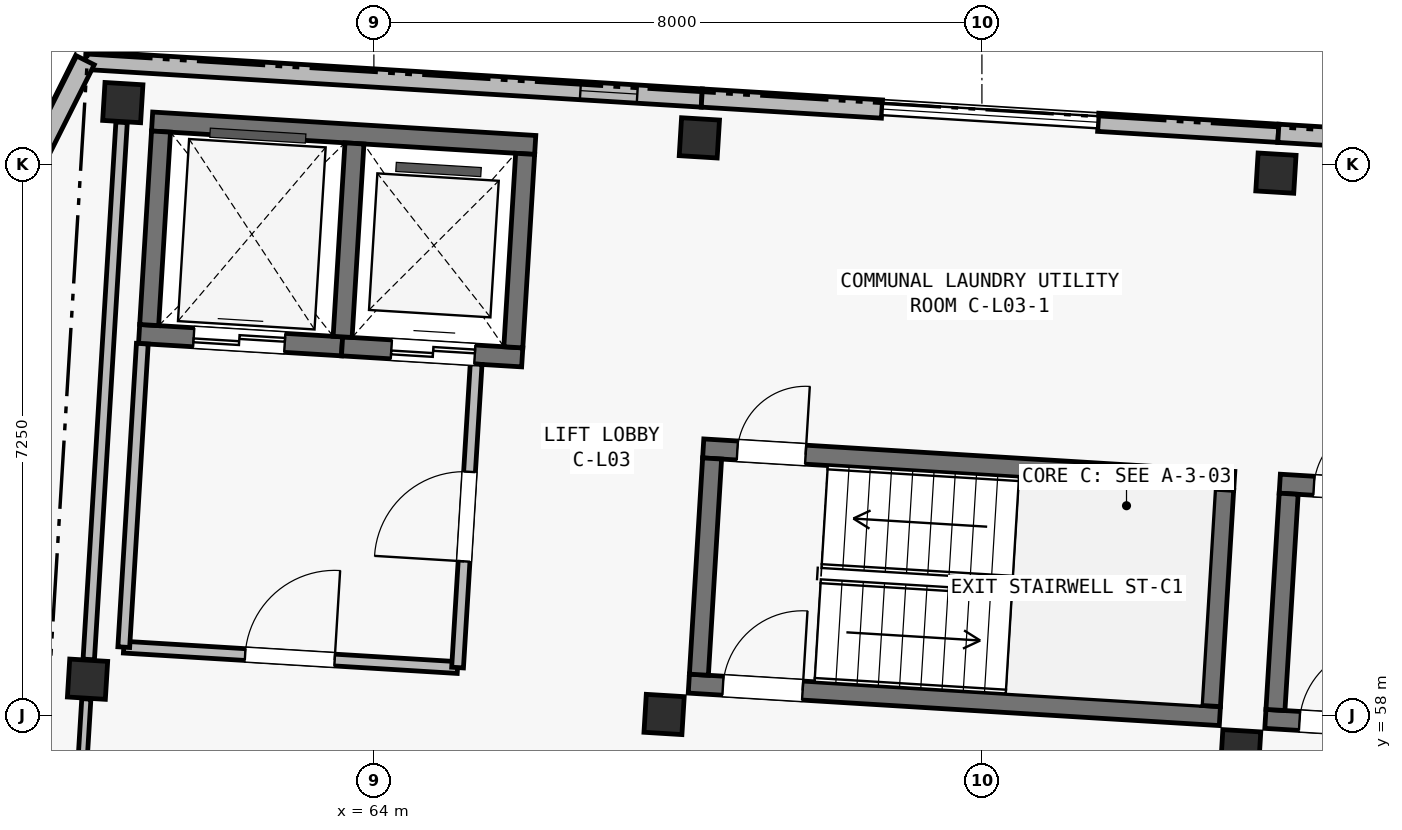
"""IFC4 building model, lengths in metres.
Left out: names, types, materials, properties, quantities, classifications, styles, units other than length and angle.
Written with IfcOpenShell. Run it as: python <this file> out.ifc"""

import sys

from ifc_helpers import new_model, si_unit, direction, frame, frame_2d, origin, origin_2d, place, context, subcontext, project, spatial, rectangle, extrude, element, fill, save


model = new_model("IFC4")
c1 = context("Model", 3, precision=1e-05, world=origin(), true_north=direction((0.0, 1.0)))
c2 = subcontext(c1, "Body", "Model", "MODEL_VIEW")
j1 = project(units=[si_unit("LENGTHUNIT", "METRE"), si_unit("PLANEANGLEUNIT", "RADIAN")], contexts=[c1])
p1 = place(None, origin())
s1 = spatial("IfcSite", under=j1, at=p1, CompositionType="ELEMENT")
p2 = place(p1, origin())
s2 = spatial("IfcBuilding", under=s1, at=p2, CompositionType="ELEMENT")
p3 = place(p2, frame((0.0, 0.0, 11.65)))
s3 = spatial("IfcBuildingStorey", under=s2, at=p3, CompositionType="ELEMENT", Elevation=11.65)
for number, where, z_axis, x_axis in (
    (1, (60.233, 58.478, 0.0), (0.0, 0.0, 1.0), (0.998, -0.061, 0.0)),
    (2, (60.697, 66.063, 0.0), (0.0, 0.0, 1.0), (0.998, -0.061, 0.0)),
    (3, (67.818, 58.014, 0.0), (0.0, 0.0, 1.0), (0.998, -0.061, 0.0)),
    (4, (68.282, 65.599, 0.0), (0.0, 0.0, 1.0), (0.998, -0.061, 0.0)),
    (5, (75.404, 57.55, 0.0), (0.0, 0.0, 1.0), (0.998, -0.061, 0.0)),
    (6, (75.868, 65.135, 0.0), (0.0, 0.0, 1.0), (0.998, -0.061, 0.0)),
):
    element("IfcColumn", number, at=place(p3, frame(where, z_axis=z_axis, x_axis=x_axis)), inside=s3, PredefinedType="COLUMN", context=c2, shape_type="SweptSolid", body=[
        extrude(rectangle(XDim=0.5, YDim=0.5, at=origin_2d()), origin(), (0.0, 0.0, 1.0), 3.25),
    ])
p4 = place(p3, frame((61.082, 65.814, 0.0), z_axis=(0.0, 0.0, 1.0), x_axis=(0.998134101522, -0.061059932685, 0.0)))
e7 = element("IfcWall", 7, at=p4, inside=s3, PredefinedType="SHEAR", context=c2, shape_type="SweptSolid", body=[
    extrude(rectangle(XDim=5.05, YDim=0.25, at=frame_2d((2.525, 0.0))), origin(), (0.0, 0.0, 1.0), 3.25),
])
p5 = place(p3, frame((60.911, 63.02, 0.0), z_axis=(0.0, 0.0, 1.0), x_axis=(0.998134099905, -0.061059959111, 0.0)))
e8 = element("IfcWall", 8, at=p5, inside=s3, PredefinedType="SHEAR", context=c2, shape_type="SweptSolid", body=[
    extrude(rectangle(XDim=2.675, YDim=0.25, at=frame_2d((1.337, 0.0))), origin(), (0.0, 0.0, 1.0), 3.25),
])
p6 = place(p5, frame((0.72, 0.0, 0.0)))
e9 = element("IfcOpeningElement", 9, at=p6, cuts=e8, PredefinedType="OPENING", context=c2, shape_type="SweptSolid", body=[
    extrude(rectangle(XDim=1.2, YDim=2.2, at=frame_2d((0.6, 1.1))), frame((0.0, 0.14, 0.0), z_axis=(0.0, -1.0, 0.0), x_axis=(1.0, 0.0, 0.0)), (0.0, 0.0, 1.0), 0.28),
])
p7 = place(p3, frame((63.581, 62.856, 0.0), z_axis=(0.0, 0.0, 1.0), x_axis=(0.998134103342, -0.061059902923, 0.0)))
e10 = element("IfcWall", 10, at=p7, inside=s3, PredefinedType="SHEAR", context=c2, shape_type="SweptSolid", body=[
    extrude(rectangle(XDim=2.375, YDim=0.25, at=frame_2d((1.188, 0.0))), origin(), (0.0, 0.0, 1.0), 3.25),
])
p8 = place(p7, frame((0.65, 0.0, 0.0)))
e11 = element("IfcOpeningElement", 11, at=p8, cuts=e10, PredefinedType="OPENING", context=c2, shape_type="SweptSolid", body=[
    extrude(rectangle(XDim=1.1, YDim=2.15, at=frame_2d((0.55, 1.075))), frame((0.0, 0.14, 0.0), z_axis=(0.0, -1.0, 0.0), x_axis=(1.0, 0.0, 0.0)), (0.0, 0.0, 1.0), 0.28),
])
p9 = place(p3, frame((61.043, 63.137, 0.0), z_axis=(0.0, 0.0, 1.0), x_axis=(0.061078919587, 0.998132939834, 0.0)))
e12 = element("IfcWall", 12, at=p9, inside=s3, PredefinedType="SHEAR", context=c2, shape_type="SweptSolid", body=[
    extrude(rectangle(XDim=2.55, YDim=0.25, at=frame_2d((1.275, 0.0))), origin(), (0.0, 0.0, 1.0), 3.25),
])
p10 = place(p3, frame((63.589, 62.981, 0.0), z_axis=(0.0, 0.0, 1.0), x_axis=(0.060989368901, 0.998138415692, 0.0)))
e13 = element("IfcWall", 13, at=p10, inside=s3, PredefinedType="SHEAR", context=c2, shape_type="SweptSolid", body=[
    extrude(rectangle(XDim=2.55, YDim=0.25, at=frame_2d((1.275, 0.0))), origin(), (0.0, 0.0, 1.0), 3.25),
])
p11 = place(p3, frame((65.834, 62.844, 0.0), z_axis=(0.0, 0.0, 1.0), x_axis=(0.061084756616, 0.998132582631, 0.0)))
e14 = element("IfcWall", 14, at=p11, inside=s3, PredefinedType="SHEAR", context=c2, shape_type="SweptSolid", body=[
    extrude(rectangle(XDim=2.55, YDim=0.25, at=frame_2d((1.275, 0.0))), origin(), (0.0, 0.0, 1.0), 3.25),
])
p12 = place(p3, frame((68.333, 61.514, 0.0), z_axis=(0.0, 0.0, 1.0), x_axis=(0.998135676081, -0.061034188237, 0.0)))
e15 = element("IfcWall", 15, at=p12, inside=s3, PredefinedType="SHEAR", context=c2, shape_type="SweptSolid", body=[
    extrude(rectangle(XDim=7.0, YDim=0.25, at=frame_2d((3.5, 0.0))), origin(), (0.0, 0.0, 1.0), 3.25),
])
p13 = place(p12, frame((0.45, 0.0, 0.0)))
e16 = element("IfcOpeningElement", 16, at=p13, cuts=e15, PredefinedType="OPENING", context=c2, shape_type="SweptSolid", body=[
    extrude(rectangle(XDim=0.9, YDim=2.1, at=frame_2d((0.45, 1.05))), frame((0.0, 0.14, 0.0), z_axis=(0.0, -1.0, 0.0), x_axis=(1.0, 0.0, 0.0)), (0.0, 0.0, 1.0), 0.28),
])
p14 = place(p3, frame((68.144, 58.419, 0.0), z_axis=(0.0, 0.0, 1.0), x_axis=(0.998135546153, -0.061036313012, 0.0)))
e17 = element("IfcWall", 17, at=p14, inside=s3, PredefinedType="SHEAR", context=c2, shape_type="SweptSolid", body=[
    extrude(rectangle(XDim=7.0, YDim=0.25, at=frame_2d((3.5, 0.0))), origin(), (0.0, 0.0, 1.0), 3.25),
])
p15 = place(p14, frame((0.45, 0.0, 0.0)))
e18 = element("IfcOpeningElement", 18, at=p15, cuts=e17, PredefinedType="OPENING", context=c2, shape_type="SweptSolid", body=[
    extrude(rectangle(XDim=1.05, YDim=2.15, at=frame_2d((0.525, 1.075))), frame((0.0, 0.14, 0.0), z_axis=(0.0, -1.0, 0.0), x_axis=(1.0, 0.0, 0.0)), (0.0, 0.0, 1.0), 0.28),
])
for number, where, z_axis, x_axis in (
    (19, (68.276, 58.537, 0.0), (0.0, 0.0, 1.0), (0.061, 0.998, 0.0)),
    (20, (75.014, 58.125, 0.0), (0.0, 0.0, 1.0), (0.061, 0.998, 0.0)),
):
    element("IfcWall", number, at=place(p3, frame(where, z_axis=z_axis, x_axis=x_axis)), inside=s3, PredefinedType="SHEAR", context=c2, shape_type="SweptSolid", body=[
        extrude(rectangle(XDim=2.85, YDim=0.25, at=frame_2d((1.425, 0.0))), origin(), (0.0, 0.0, 1.0), 3.25),
    ])
p16 = place(p3, frame((75.919, 61.05, 0.0), z_axis=(0.0, 0.0, 1.0), x_axis=(0.998135546153, -0.061036313012, 0.0)))
e21 = element("IfcWall", 21, at=p16, inside=s3, PredefinedType="SHEAR", context=c2, shape_type="SweptSolid", body=[
    extrude(rectangle(XDim=7.0, YDim=0.25, at=frame_2d((3.5, 0.0))), origin(), (0.0, 0.0, 1.0), 3.25),
])
p17 = place(p16, frame((0.45, 0.0, 0.0)))
e22 = element("IfcOpeningElement", 22, at=p17, cuts=e21, PredefinedType="OPENING", context=c2, shape_type="SweptSolid", body=[
    extrude(rectangle(XDim=0.9, YDim=2.1, at=frame_2d((0.45, 1.05))), frame((0.0, 0.14, 0.0), z_axis=(0.0, -1.0, 0.0), x_axis=(1.0, 0.0, 0.0)), (0.0, 0.0, 1.0), 0.28),
])
p18 = place(p3, frame((75.73, 57.956, 0.0), z_axis=(0.0, 0.0, 1.0), x_axis=(0.998135546153, -0.061036313012, 0.0)))
e23 = element("IfcWall", 23, at=p18, inside=s3, PredefinedType="SHEAR", context=c2, shape_type="SweptSolid", body=[
    extrude(rectangle(XDim=7.0, YDim=0.25, at=frame_2d((3.5, 0.0))), origin(), (0.0, 0.0, 1.0), 3.25),
])
p19 = place(p18, frame((0.45, 0.0, 0.0)))
e24 = element("IfcOpeningElement", 24, at=p19, cuts=e23, PredefinedType="OPENING", context=c2, shape_type="SweptSolid", body=[
    extrude(rectangle(XDim=1.05, YDim=2.15, at=frame_2d((0.525, 1.075))), frame((0.0, 0.14, 0.0), z_axis=(0.0, -1.0, 0.0), x_axis=(1.0, 0.0, 0.0)), (0.0, 0.0, 1.0), 0.28),
])
p20 = place(p3, frame((75.862, 58.073, 0.0), z_axis=(0.0, 0.0, 1.0), x_axis=(0.060991628362, 0.99813827763, 0.0)))
e25 = element("IfcWall", 25, at=p20, inside=s3, PredefinedType="SHEAR", context=c2, shape_type="SweptSolid", body=[
    extrude(rectangle(XDim=2.85, YDim=0.25, at=frame_2d((1.425, 0.0))), origin(), (0.0, 0.0, 1.0), 3.25),
])
p21 = place(p3, frame((60.205, 66.62, 0.0), z_axis=(0.0, 0.0, 1.0), x_axis=(0.998134248939, -0.061057522844, 0.0)))
e26 = element("IfcWall", 26, at=p21, inside=s3, PredefinedType="SOLIDWALL", context=c2, shape_type="SweptSolid", body=[
    extrude(rectangle(XDim=8.125, YDim=0.24, at=frame_2d((4.062, 0.0))), origin(), (0.0, 0.0, 1.0), 3.0),
])
p22 = place(p21, frame((6.525, 0.0, 0.45)))
e27 = element("IfcOpeningElement", 27, at=p22, cuts=e26, PredefinedType="OPENING", context=c2, shape_type="SweptSolid", body=[
    extrude(rectangle(XDim=0.75, YDim=2.32, at=frame_2d((0.375, 1.16))), frame((0.0, 0.135, 0.0), z_axis=(0.0, -1.0, 0.0), x_axis=(1.0, 0.0, 0.0)), (0.0, 0.0, 1.0), 0.27),
])
p23 = place(p3, frame((68.314, 66.124, 0.0), z_axis=(0.0, 0.0, 1.0), x_axis=(0.998134103342, -0.061059902923, 0.0)))
e28 = element("IfcWall", 28, at=p23, inside=s3, PredefinedType="SOLIDWALL", context=c2, shape_type="SweptSolid", body=[
    extrude(rectangle(XDim=2.375, YDim=0.24, at=frame_2d((1.188, 0.0))), origin(), (0.0, 0.0, 1.0), 3.0),
])
p24 = place(p3, frame((73.53, 65.804, 0.0), z_axis=(0.0, 0.0, 1.0), x_axis=(0.998133720034, -0.061066168473, 0.0)))
e29 = element("IfcWall", 29, at=p24, inside=s3, PredefinedType="SOLIDWALL", context=c2, shape_type="SweptSolid", body=[
    extrude(rectangle(XDim=2.375, YDim=0.24, at=frame_2d((1.188, 0.0))), origin(), (0.0, 0.0, 1.0), 3.0),
])
p25 = place(p3, frame((75.9, 65.659, 0.0), z_axis=(0.0, 0.0, 1.0), x_axis=(0.998140363035, -0.06095749076, 0.0)))
e30 = element("IfcWall", 30, at=p25, inside=s3, PredefinedType="SOLIDWALL", context=c2, shape_type="SweptSolid", body=[
    extrude(rectangle(XDim=2.375, YDim=0.24, at=frame_2d((1.188, 0.0))), origin(), (0.0, 0.0, 1.0), 3.0),
])
p26 = place(p3, frame((51.654, 49.585, 0.0), z_axis=(0.0, 0.0, 1.0), x_axis=(0.448621989068, 0.893721607059, 0.0)))
e31 = element("IfcWall", 31, at=p26, inside=s3, PredefinedType="SOLIDWALL", context=c2, shape_type="SweptSolid", body=[
    extrude(rectangle(XDim=19.061, YDim=0.26, at=frame_2d((9.53, 0.0))), origin(), (0.0, 0.0, 1.0), 3.0),
])
p27 = place(p26, frame((15.59, 0.0, 0.45)))
e32 = element("IfcOpeningElement", 32, at=p27, cuts=e31, PredefinedType="OPENING", context=c2, shape_type="SweptSolid", body=[
    extrude(rectangle(XDim=0.84, YDim=2.28, at=frame_2d((0.42, 1.14))), frame((0.0, 0.145, 0.0), z_axis=(0.0, -1.0, 0.0), x_axis=(1.0, 0.0, 0.0)), (0.0, 0.0, 1.0), 0.29),
])
p28 = place(p3, frame((60.709, 58.899, 0.0), z_axis=(0.0, 0.0, 1.0), x_axis=(0.998132276607, -0.061089756882, 0.0)))
e33 = element("IfcWall", 33, at=p28, inside=s3, PredefinedType="PARTITIONING", context=c2, shape_type="SweptSolid", body=[
    extrude(rectangle(XDim=4.4, YDim=0.155, at=frame_2d((2.2, 0.0))), origin(), (0.0, 0.0, 1.0), 2.97),
])
p29 = place(p28, frame((1.6, 0.0, 0.0)))
e34 = element("IfcOpeningElement", 34, at=p29, cuts=e33, PredefinedType="OPENING", context=c2, shape_type="SweptSolid", body=[
    extrude(rectangle(XDim=1.18, YDim=2.15, at=frame_2d((0.59, 1.075))), frame((0.0, 0.093, 0.0), z_axis=(0.0, -1.0, 0.0), x_axis=(1.0, 0.0, 0.0)), (0.0, 0.0, 1.0), 0.185),
])
p30 = place(p3, frame((60.709, 58.899, 0.0), z_axis=(0.0, 0.0, 1.0), x_axis=(0.061036844229, 0.998135513669, 0.0)))
e35 = element("IfcWall", 35, at=p30, inside=s3, PredefinedType="PARTITIONING", context=c2, shape_type="SweptSolid", body=[
    extrude(rectangle(XDim=4.0, YDim=0.155, at=frame_2d((2.0, 0.0))), origin(), (0.0, 0.0, 1.0), 2.97),
])
p31 = place(p3, frame((65.101, 58.631, 0.0), z_axis=(0.0, 0.0, 1.0), x_axis=(0.061033125904, 0.99813574104, 0.0)))
e36 = element("IfcWall", 36, at=p31, inside=s3, PredefinedType="PARTITIONING", context=c2, shape_type="SweptSolid", body=[
    extrude(rectangle(XDim=4.0, YDim=0.155, at=frame_2d((2.0, 0.0))), origin(), (0.0, 0.0, 1.0), 2.97),
])
p32 = place(p31, frame((1.4, 0.0, 0.0)))
e37 = element("IfcOpeningElement", 37, at=p32, cuts=e36, PredefinedType="OPENING", context=c2, shape_type="SweptSolid", body=[
    extrude(rectangle(XDim=1.18, YDim=2.15, at=frame_2d((0.59, 1.075))), frame((0.0, 0.093, 0.0), z_axis=(0.0, -1.0, 0.0), x_axis=(1.0, 0.0, 0.0)), (0.0, 0.0, 1.0), 0.185),
])
p33 = place(p3, frame((59.98, 54.345, 0.0), z_axis=(0.0, 0.0, 1.0), x_axis=(0.061101107425, 0.998131581843, 0.0)))
e38 = element("IfcWall", 38, at=p33, inside=s3, PredefinedType="PARTITIONING", context=c2, shape_type="SweptSolid", body=[
    extrude(rectangle(XDim=3.88, YDim=0.12, at=frame_2d((1.94, 0.0))), origin(), (0.0, 0.0, 1.0), 2.5),
])
p34 = place(p33, frame((1.35, 0.0, 0.0)))
e39 = element("IfcOpeningElement", 39, at=p34, cuts=e38, PredefinedType="OPENING", context=c2, shape_type="SweptSolid", body=[
    extrude(rectangle(XDim=0.88, YDim=2.1, at=frame_2d((0.44, 1.05))), frame((0.0, 0.075, 0.0), z_axis=(0.0, -1.0, 0.0), x_axis=(1.0, 0.0, 0.0)), (0.0, 0.0, 1.0), 0.15),
])
p35 = place(p3, frame((60.249, 58.737, 0.0), z_axis=(0.0, 0.0, 1.0), x_axis=(0.061034344288, 0.998135666539, 0.0)))
e40 = element("IfcWall", 40, at=p35, inside=s3, PredefinedType="PARTITIONING", context=c2, shape_type="SweptSolid", body=[
    extrude(rectangle(XDim=7.08, YDim=0.15, at=frame_2d((3.54, 0.0))), origin(), (0.0, 0.0, 1.0), 2.5),
])
p36 = place(p22, origin())
e41 = element("IfcWindow", 41, at=p36, inside=s3, PartitioningType="SINGLE_PANEL", PredefinedType="WINDOW", context=c2, shape_type="SweptSolid", body=[
    extrude(rectangle(XDim=0.75, YDim=2.32, at=frame_2d((0.375, 1.16))), frame((0.0, 0.03, 0.0), z_axis=(0.0, -1.0, 0.0), x_axis=(1.0, 0.0, 0.0)), (0.0, 0.0, 1.0), 0.06),
])
fill(e27, e41)
p37 = place(p29, origin())
e42 = element("IfcDoor", 42, at=p37, inside=s3, OperationType="SINGLE_SWING_RIGHT", PredefinedType="DOOR", context=c2, shape_type="SweptSolid", body=[
    extrude(rectangle(XDim=1.18, YDim=2.15, at=frame_2d((0.59, 1.075))), frame((0.0, 0.025, 0.0), z_axis=(0.0, -1.0, 0.0), x_axis=(1.0, 0.0, 0.0)), (0.0, 0.0, 1.0), 0.05),
])
fill(e34, e42)
p38 = place(p32, origin())
e43 = element("IfcDoor", 43, at=p38, inside=s3, OperationType="SINGLE_SWING_LEFT", PredefinedType="DOOR", context=c2, shape_type="SweptSolid", body=[
    extrude(rectangle(XDim=1.18, YDim=2.15, at=frame_2d((0.59, 1.075))), frame((0.0, 0.025, 0.0), z_axis=(0.0, -1.0, 0.0), x_axis=(1.0, 0.0, 0.0)), (0.0, 0.0, 1.0), 0.05),
])
fill(e37, e43)
p39 = place(p15, origin())
e44 = element("IfcDoor", 44, at=p39, inside=s3, OperationType="SINGLE_SWING_RIGHT", PredefinedType="DOOR", context=c2, shape_type="SweptSolid", body=[
    extrude(rectangle(XDim=1.05, YDim=2.15, at=frame_2d((0.525, 1.075))), frame((0.0, 0.025, 0.0), z_axis=(0.0, -1.0, 0.0), x_axis=(1.0, 0.0, 0.0)), (0.0, 0.0, 1.0), 0.05),
])
fill(e18, e44)
p40 = place(p13, origin())
e45 = element("IfcDoor", 45, at=p40, inside=s3, OperationType="SINGLE_SWING_RIGHT", PredefinedType="DOOR", context=c2, shape_type="SweptSolid", body=[
    extrude(rectangle(XDim=0.9, YDim=2.1, at=frame_2d((0.45, 1.05))), frame((0.0, 0.025, 0.0), z_axis=(0.0, -1.0, 0.0), x_axis=(1.0, 0.0, 0.0)), (0.0, 0.0, 1.0), 0.05),
])
fill(e16, e45)
p41 = place(p19, origin())
e46 = element("IfcDoor", 46, at=p41, inside=s3, OperationType="SINGLE_SWING_RIGHT", PredefinedType="DOOR", context=c2, shape_type="SweptSolid", body=[
    extrude(rectangle(XDim=1.05, YDim=2.15, at=frame_2d((0.525, 1.075))), frame((0.0, 0.025, 0.0), z_axis=(0.0, -1.0, 0.0), x_axis=(1.0, 0.0, 0.0)), (0.0, 0.0, 1.0), 0.05),
])
fill(e24, e46)
p42 = place(p17, origin())
e47 = element("IfcDoor", 47, at=p42, inside=s3, OperationType="SINGLE_SWING_RIGHT", PredefinedType="DOOR", context=c2, shape_type="SweptSolid", body=[
    extrude(rectangle(XDim=0.9, YDim=2.1, at=frame_2d((0.45, 1.05))), frame((0.0, 0.025, 0.0), z_axis=(0.0, -1.0, 0.0), x_axis=(1.0, 0.0, 0.0)), (0.0, 0.0, 1.0), 0.05),
])
fill(e22, e47)
p43 = place(p6, origin())
e48 = element("IfcDoor", 48, at=p43, inside=s3, OperationType="DOUBLE_DOOR_SLIDING", PredefinedType="DOOR", context=c2, shape_type="SweptSolid", body=[
    extrude(rectangle(XDim=1.2, YDim=2.2, at=frame_2d((0.6, 1.1))), frame((0.0, 0.025, 0.0), z_axis=(0.0, -1.0, 0.0), x_axis=(1.0, 0.0, 0.0)), (0.0, 0.0, 1.0), 0.05),
])
fill(e9, e48)
p44 = place(p8, origin())
e49 = element("IfcDoor", 49, at=p44, inside=s3, OperationType="DOUBLE_DOOR_SLIDING", PredefinedType="DOOR", context=c2, shape_type="SweptSolid", body=[
    extrude(rectangle(XDim=1.1, YDim=2.15, at=frame_2d((0.55, 1.075))), frame((0.0, 0.025, 0.0), z_axis=(0.0, -1.0, 0.0), x_axis=(1.0, 0.0, 0.0)), (0.0, 0.0, 1.0), 0.05),
])
fill(e11, e49)
save(model, sys.argv[1])
